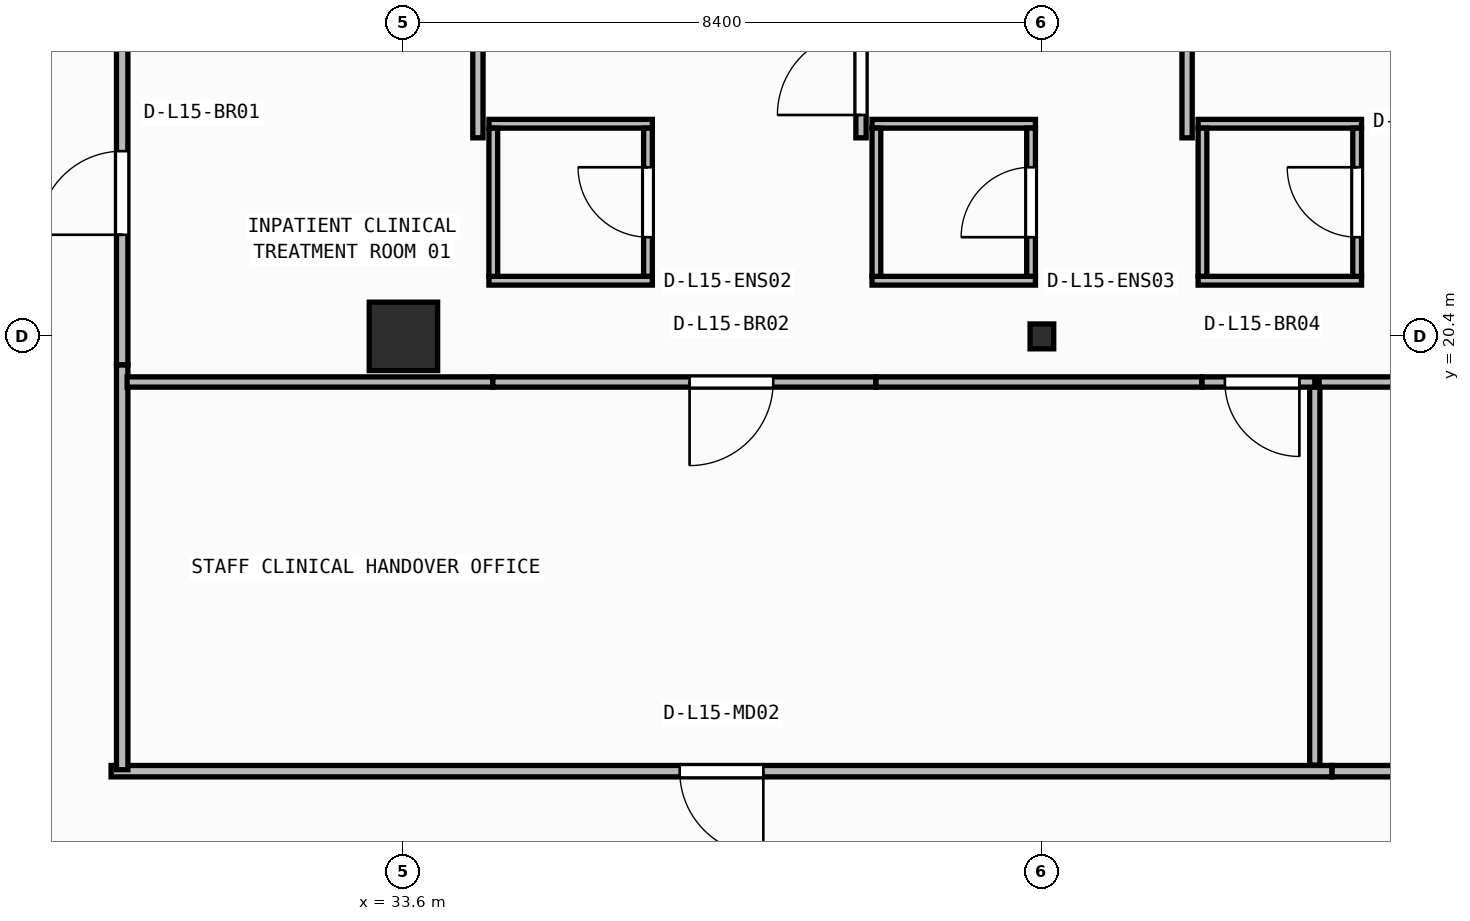
"""IFC4 building model, lengths in metres.
Left out: names, types, materials, properties, quantities, classifications, styles, units other than length and angle.
Written with IfcOpenShell. Run it as: python <this file> out.ifc"""

import sys

from ifc_helpers import new_model, si_unit, direction, frame, frame_2d, origin, origin_2d, place, context, subcontext, project, spatial, rectangle, i_section, extrude, element, fill, save


model = new_model("IFC4")
c1 = context("Model", 3, precision=1e-05, world=origin(), true_north=direction((0.0, 1.0)))
c2 = subcontext(c1, "Body", "Model", "MODEL_VIEW")
j1 = project(units=[si_unit("LENGTHUNIT", "METRE"), si_unit("PLANEANGLEUNIT", "RADIAN")], contexts=[c1])
p1 = place(None, origin())
s1 = spatial("IfcSite", under=j1, at=p1, CompositionType="ELEMENT")
p2 = place(p1, origin())
s2 = spatial("IfcBuilding", under=s1, at=p2, CompositionType="ELEMENT")
p3 = place(p2, frame((0.0, 0.0, 62.0)))
s3 = spatial("IfcBuildingStorey", under=s2, at=p3, CompositionType="ELEMENT", Elevation=62.0)
p4 = place(p3, frame((33.6, 20.4, 0.0), z_axis=(0.0, 0.0, 1.0), x_axis=(1.0, 0.0, 0.0)))
e1 = element("IfcColumn", 1, at=p4, inside=s3, PredefinedType="COLUMN", context=c2, shape_type="SweptSolid", body=[
    extrude(rectangle(XDim=0.9, YDim=0.9, at=origin_2d()), origin(), (0.0, 0.0, 1.0), 3.95),
])
p5 = place(p3, frame((42.0, 20.4, 0.0), z_axis=(0.0, 0.0, 1.0), x_axis=(1.0, 0.0, 0.0)))
e2 = element("IfcColumn", 2, at=p5, inside=s3, PredefinedType="COLUMN", context=c2, shape_type="SweptSolid", body=[
    extrude(i_section(OverallWidth=0.311, OverallDepth=0.327, WebThickness=0.016, FlangeThickness=0.025, FilletRadius=0.017, at=origin_2d()), origin(), (0.0, 0.0, 1.0), 3.95),
])
for number, where, z_axis, x_axis in (
    (3, (34.725, 21.133, 0.0), (0.0, 0.0, 1.0), (1.0, 0.0, 0.0)),
    (4, (34.725, 23.198, 0.0), (0.0, 0.0, 1.0), (1.0, 0.0, 0.0)),
):
    element("IfcWall", number, at=place(p3, frame(where, z_axis=z_axis, x_axis=x_axis)), inside=s3, PredefinedType="PARTITIONING", context=c2, shape_type="SweptSolid", body=[
        extrude(rectangle(XDim=2.15, YDim=0.115, at=frame_2d((1.075, 0.0))), origin(), (0.0, 0.0, 1.0), 3.71),
    ])
p6 = place(p3, frame((34.782, 21.19, 0.0), z_axis=(0.0, 0.0, 1.0), x_axis=(0.0, 1.0, 0.0)))
e5 = element("IfcWall", 5, at=p6, inside=s3, PredefinedType="PARTITIONING", context=c2, shape_type="SweptSolid", body=[
    extrude(rectangle(XDim=1.95, YDim=0.115, at=frame_2d((0.975, 0.0))), origin(), (0.0, 0.0, 1.0), 3.71),
])
p7 = place(p3, frame((36.817, 21.19, 0.0), z_axis=(0.0, 0.0, 1.0), x_axis=(0.0, 1.0, 0.0)))
e6 = element("IfcWall", 6, at=p7, inside=s3, PredefinedType="PARTITIONING", context=c2, shape_type="SweptSolid", body=[
    extrude(rectangle(XDim=1.95, YDim=0.115, at=frame_2d((0.975, 0.0))), origin(), (0.0, 0.0, 1.0), 3.71),
])
p8 = place(p7, frame((0.515, 0.0, 0.0)))
e7 = element("IfcOpeningElement", 7, at=p8, cuts=e6, PredefinedType="OPENING", context=c2, shape_type="SweptSolid", body=[
    extrude(rectangle(XDim=0.92, YDim=2.1, at=frame_2d((0.46, 1.05))), frame((0.0, 0.067, 0.0), z_axis=(0.0, -1.0, 0.0), x_axis=(1.0, 0.0, 0.0)), (0.0, 0.0, 1.0), 0.135),
])
for number, where, z_axis, x_axis in (
    (8, (39.765, 21.133, 0.0), (0.0, 0.0, 1.0), (1.0, 0.0, 0.0)),
    (9, (39.765, 23.198, 0.0), (0.0, 0.0, 1.0), (1.0, 0.0, 0.0)),
):
    element("IfcWall", number, at=place(p3, frame(where, z_axis=z_axis, x_axis=x_axis)), inside=s3, PredefinedType="PARTITIONING", context=c2, shape_type="SweptSolid", body=[
        extrude(rectangle(XDim=2.15, YDim=0.115, at=frame_2d((1.075, 0.0))), origin(), (0.0, 0.0, 1.0), 3.71),
    ])
p9 = place(p3, frame((39.823, 21.19, 0.0), z_axis=(0.0, 0.0, 1.0), x_axis=(0.0, 1.0, 0.0)))
e10 = element("IfcWall", 10, at=p9, inside=s3, PredefinedType="PARTITIONING", context=c2, shape_type="SweptSolid", body=[
    extrude(rectangle(XDim=1.95, YDim=0.115, at=frame_2d((0.975, 0.0))), origin(), (0.0, 0.0, 1.0), 3.71),
])
p10 = place(p3, frame((41.857, 21.19, 0.0), z_axis=(0.0, 0.0, 1.0), x_axis=(0.0, 1.0, 0.0)))
e11 = element("IfcWall", 11, at=p10, inside=s3, PredefinedType="PARTITIONING", context=c2, shape_type="SweptSolid", body=[
    extrude(rectangle(XDim=1.95, YDim=0.115, at=frame_2d((0.975, 0.0))), origin(), (0.0, 0.0, 1.0), 3.073),
])
p11 = place(p10, frame((0.515, 0.0, 0.0)))
e12 = element("IfcOpeningElement", 12, at=p11, cuts=e11, PredefinedType="OPENING", context=c2, shape_type="SweptSolid", body=[
    extrude(rectangle(XDim=0.92, YDim=2.1, at=frame_2d((0.46, 1.05))), frame((0.0, 0.067, 0.0), z_axis=(0.0, -1.0, 0.0), x_axis=(1.0, 0.0, 0.0)), (0.0, 0.0, 1.0), 0.135),
])
for number, where, z_axis, x_axis in (
    (13, (44.055, 21.133, 0.0), (0.0, 0.0, 1.0), (1.0, 0.0, 0.0)),
    (14, (44.055, 23.198, 0.0), (0.0, 0.0, 1.0), (1.0, 0.0, 0.0)),
):
    element("IfcWall", number, at=place(p3, frame(where, z_axis=z_axis, x_axis=x_axis)), inside=s3, PredefinedType="PARTITIONING", context=c2, shape_type="SweptSolid", body=[
        extrude(rectangle(XDim=2.15, YDim=0.115, at=frame_2d((1.075, 0.0))), origin(), (0.0, 0.0, 1.0), 3.71),
    ])
p12 = place(p3, frame((44.113, 21.19, 0.0), z_axis=(0.0, 0.0, 1.0), x_axis=(0.0, 1.0, 0.0)))
e15 = element("IfcWall", 15, at=p12, inside=s3, PredefinedType="PARTITIONING", context=c2, shape_type="SweptSolid", body=[
    extrude(rectangle(XDim=1.95, YDim=0.115, at=frame_2d((0.975, 0.0))), origin(), (0.0, 0.0, 1.0), 3.71),
])
p13 = place(p3, frame((46.147, 21.19, 0.0), z_axis=(0.0, 0.0, 1.0), x_axis=(0.0, 1.0, 0.0)))
e16 = element("IfcWall", 16, at=p13, inside=s3, PredefinedType="PARTITIONING", context=c2, shape_type="SweptSolid", body=[
    extrude(rectangle(XDim=1.95, YDim=0.115, at=frame_2d((0.975, 0.0))), origin(), (0.0, 0.0, 1.0), 3.71),
])
p14 = place(p13, frame((0.515, 0.0, 0.0)))
e17 = element("IfcOpeningElement", 17, at=p14, cuts=e16, PredefinedType="OPENING", context=c2, shape_type="SweptSolid", body=[
    extrude(rectangle(XDim=0.92, YDim=2.1, at=frame_2d((0.46, 1.05))), frame((0.0, 0.067, 0.0), z_axis=(0.0, -1.0, 0.0), x_axis=(1.0, 0.0, 0.0)), (0.0, 0.0, 1.0), 0.135),
])
p15 = place(p3, frame((45.816, 14.68, 0.0), z_axis=(0.0, 0.0, 1.0), x_axis=(-1.0, 0.0, 0.0)))
e18 = element("IfcWall", 18, at=p15, inside=s3, PredefinedType="PARTITIONING", context=c2, shape_type="SweptSolid", body=[
    extrude(rectangle(XDim=16.062, YDim=0.15, at=frame_2d((8.031, 0.0))), origin(), (0.0, 0.0, 1.0), 3.71),
])
p16 = place(p15, frame((7.481, 0.0, 0.0)))
e19 = element("IfcOpeningElement", 19, at=p16, cuts=e18, PredefinedType="OPENING", context=c2, shape_type="SweptSolid", body=[
    extrude(rectangle(XDim=1.1, YDim=2.1, at=frame_2d((0.55, 1.05))), frame((0.0, 0.085, 0.0), z_axis=(0.0, -1.0, 0.0), x_axis=(1.0, 0.0, 0.0)), (0.0, 0.0, 1.0), 0.17),
])
p17 = place(p3, frame((58.04, 14.68, 0.0), z_axis=(0.0, 0.0, 1.0), x_axis=(-1.0, 0.0, 0.0)))
e20 = element("IfcWall", 20, at=p17, inside=s3, PredefinedType="PARTITIONING", context=c2, shape_type="SweptSolid", body=[
    extrude(rectangle(XDim=12.222, YDim=0.15, at=frame_2d((6.111, 0.0))), origin(), (0.0, 0.0, 1.0), 3.71),
])
p18 = place(p17, frame((5.561, 0.0, 0.0)))
e21 = element("IfcOpeningElement", 21, at=p18, cuts=e20, PredefinedType="OPENING", context=c2, shape_type="SweptSolid", body=[
    extrude(rectangle(XDim=1.1, YDim=2.1, at=frame_2d((0.55, 1.05))), frame((0.0, 0.085, 0.0), z_axis=(0.0, -1.0, 0.0), x_axis=(1.0, 0.0, 0.0)), (0.0, 0.0, 1.0), 0.17),
])
p19 = place(p3, frame((29.9, 14.7, 0.0), z_axis=(0.0, 0.0, 1.0), x_axis=(0.0, 1.0, 0.0)))
e22 = element("IfcWall", 22, at=p19, inside=s3, PredefinedType="PARTITIONING", context=c2, shape_type="SweptSolid", body=[
    extrude(rectangle(XDim=5.326, YDim=0.15, at=frame_2d((2.663, 0.0))), origin(), (0.0, 0.0, 1.0), 3.71),
])
p20 = place(p3, frame((29.9, 20.028, 0.0), z_axis=(0.0, 0.0, 1.0), x_axis=(0.0, 1.0, 0.0)))
e23 = element("IfcWall", 23, at=p20, inside=s3, PredefinedType="PARTITIONING", context=c2, shape_type="SweptSolid", body=[
    extrude(rectangle(XDim=4.518, YDim=0.15, at=frame_2d((2.259, 0.0))), origin(), (0.0, 0.0, 1.0), 3.71),
])
p21 = place(p20, frame((1.709, 0.0, 0.0)))
e24 = element("IfcOpeningElement", 24, at=p21, cuts=e23, PredefinedType="OPENING", context=c2, shape_type="SweptSolid", body=[
    extrude(rectangle(XDim=1.1, YDim=2.1, at=frame_2d((0.55, 1.05))), frame((0.0, 0.085, 0.0), z_axis=(0.0, -1.0, 0.0), x_axis=(1.0, 0.0, 0.0)), (0.0, 0.0, 1.0), 0.17),
])
p22 = place(p3, frame((45.59, 14.76, 0.0), z_axis=(0.0, 0.0, 1.0), x_axis=(0.0, 1.0, 0.0)))
e25 = element("IfcWall", 25, at=p22, inside=s3, PredefinedType="PARTITIONING", context=c2, shape_type="SweptSolid", body=[
    extrude(rectangle(XDim=5.04, YDim=0.135, at=frame_2d((2.52, 0.0))), origin(), (0.0, 0.0, 1.0), 3.71),
])
p23 = place(p3, frame((34.775, 19.8, 0.0), z_axis=(0.0, 0.0, 1.0), x_axis=(-1.0, 0.0, 0.0)))
e26 = element("IfcWall", 26, at=p23, inside=s3, PredefinedType="PARTITIONING", context=c2, shape_type="SweptSolid", body=[
    extrude(rectangle(XDim=4.81, YDim=0.135, at=frame_2d((2.405, 0.0))), origin(), (0.0, 0.0, 1.0), 3.71),
])
p24 = place(p3, frame((39.815, 19.8, 0.0), z_axis=(0.0, 0.0, 1.0), x_axis=(-1.0, 0.0, 0.0)))
e27 = element("IfcWall", 27, at=p24, inside=s3, PredefinedType="PARTITIONING", context=c2, shape_type="SweptSolid", body=[
    extrude(rectangle(XDim=5.038, YDim=0.135, at=frame_2d((2.519, 0.0))), origin(), (0.0, 0.0, 1.0), 3.71),
])
p25 = place(p24, frame((1.35, 0.0, 0.0)))
e28 = element("IfcOpeningElement", 28, at=p25, cuts=e27, PredefinedType="OPENING", context=c2, shape_type="SweptSolid", body=[
    extrude(rectangle(XDim=1.1, YDim=2.1, at=frame_2d((0.55, 1.05))), frame((0.0, 0.077, 0.0), z_axis=(0.0, -1.0, 0.0), x_axis=(1.0, 0.0, 0.0)), (0.0, 0.0, 1.0), 0.155),
])
p26 = place(p3, frame((44.104, 19.8, 0.0), z_axis=(0.0, 0.0, 1.0), x_axis=(-1.0, 0.0, 0.0)))
e29 = element("IfcWall", 29, at=p26, inside=s3, PredefinedType="PARTITIONING", context=c2, shape_type="SweptSolid", body=[
    extrude(rectangle(XDim=4.288, YDim=0.135, at=frame_2d((2.144, 0.0))), origin(), (0.0, 0.0, 1.0), 3.71),
])
p27 = place(p3, frame((45.59, 19.8, 0.0), z_axis=(0.0, 0.0, 1.0), x_axis=(-1.0, 0.0, 0.0)))
e30 = element("IfcWall", 30, at=p27, inside=s3, PredefinedType="PARTITIONING", context=c2, shape_type="SweptSolid", body=[
    extrude(rectangle(XDim=1.483, YDim=0.135, at=frame_2d((0.742, 0.0))), origin(), (0.0, 0.0, 1.0), 3.71),
])
p28 = place(p27, frame((0.203, 0.0, 0.0)))
e31 = element("IfcOpeningElement", 31, at=p28, cuts=e30, PredefinedType="OPENING", context=c2, shape_type="SweptSolid", body=[
    extrude(rectangle(XDim=0.98, YDim=2.1, at=frame_2d((0.49, 1.05))), frame((0.0, 0.077, 0.0), z_axis=(0.0, -1.0, 0.0), x_axis=(1.0, 0.0, 0.0)), (0.0, 0.0, 1.0), 0.155),
])
p29 = place(p3, frame((48.765, 19.8, 0.0), z_axis=(0.0, 0.0, 1.0), x_axis=(-1.0, 0.0, 0.0)))
e32 = element("IfcWall", 32, at=p29, inside=s3, PredefinedType="PARTITIONING", context=c2, shape_type="SweptSolid", body=[
    extrude(rectangle(XDim=3.117, YDim=0.135, at=frame_2d((1.559, 0.0))), origin(), (0.0, 0.0, 1.0), 3.71),
])
p30 = place(p3, frame((34.58, 23.012, 0.0), z_axis=(0.0, 0.0, 1.0), x_axis=(0.0, 1.0, 0.0)))
e33 = element("IfcWall", 33, at=p30, inside=s3, PredefinedType="PARTITIONING", context=c2, shape_type="SweptSolid", body=[
    extrude(rectangle(XDim=3.508, YDim=0.135, at=frame_2d((1.754, 0.0))), origin(), (0.0, 0.0, 1.0), 3.71),
])
p31 = place(p3, frame((39.62, 23.012, 0.0), z_axis=(0.0, 0.0, 1.0), x_axis=(0.0, 1.0, 0.0)))
e34 = element("IfcWall", 34, at=p31, inside=s3, PredefinedType="PARTITIONING", context=c2, shape_type="SweptSolid", body=[
    extrude(rectangle(XDim=3.508, YDim=0.135, at=frame_2d((1.754, 0.0))), origin(), (0.0, 0.0, 1.0), 3.71),
])
p32 = place(p31, frame((0.3, 0.0, 0.0)))
e35 = element("IfcOpeningElement", 35, at=p32, cuts=e34, PredefinedType="OPENING", context=c2, shape_type="SweptSolid", body=[
    extrude(rectangle(XDim=1.1, YDim=2.1, at=frame_2d((0.55, 1.05))), frame((0.0, 0.077, 0.0), z_axis=(0.0, -1.0, 0.0), x_axis=(1.0, 0.0, 0.0)), (0.0, 0.0, 1.0), 0.155),
])
p33 = place(p3, frame((43.91, 23.012, 0.0), z_axis=(0.0, 0.0, 1.0), x_axis=(0.0, 1.0, 0.0)))
e36 = element("IfcWall", 36, at=p33, inside=s3, PredefinedType="PARTITIONING", context=c2, shape_type="SweptSolid", body=[
    extrude(rectangle(XDim=3.508, YDim=0.135, at=frame_2d((1.754, 0.0))), origin(), (0.0, 0.0, 1.0), 3.71),
])
p34 = place(p8, origin())
e37 = element("IfcDoor", 37, at=p34, inside=s3, OperationType="SINGLE_SWING_RIGHT", PredefinedType="DOOR", context=c2, shape_type="SweptSolid", body=[
    extrude(rectangle(XDim=0.92, YDim=2.1, at=frame_2d((0.46, 1.05))), frame((0.0, 0.025, 0.0), z_axis=(0.0, -1.0, 0.0), x_axis=(1.0, 0.0, 0.0)), (0.0, 0.0, 1.0), 0.05),
])
fill(e7, e37)
p35 = place(p11, origin())
e38 = element("IfcDoor", 38, at=p35, inside=s3, OperationType="SINGLE_SWING_LEFT", PredefinedType="DOOR", context=c2, shape_type="SweptSolid", body=[
    extrude(rectangle(XDim=0.92, YDim=2.1, at=frame_2d((0.46, 1.05))), frame((0.0, 0.025, 0.0), z_axis=(0.0, -1.0, 0.0), x_axis=(1.0, 0.0, 0.0)), (0.0, 0.0, 1.0), 0.05),
])
fill(e12, e38)
p36 = place(p14, origin())
e39 = element("IfcDoor", 39, at=p36, inside=s3, OperationType="SINGLE_SWING_RIGHT", PredefinedType="DOOR", context=c2, shape_type="SweptSolid", body=[
    extrude(rectangle(XDim=0.92, YDim=2.1, at=frame_2d((0.46, 1.05))), frame((0.0, 0.025, 0.0), z_axis=(0.0, -1.0, 0.0), x_axis=(1.0, 0.0, 0.0)), (0.0, 0.0, 1.0), 0.05),
])
fill(e17, e39)
p37 = place(p16, origin())
e40 = element("IfcDoor", 40, at=p37, inside=s3, OperationType="SINGLE_SWING_LEFT", PredefinedType="DOOR", context=c2, shape_type="SweptSolid", body=[
    extrude(rectangle(XDim=1.1, YDim=2.1, at=frame_2d((0.55, 1.05))), frame((0.0, 0.025, 0.0), z_axis=(0.0, -1.0, 0.0), x_axis=(1.0, 0.0, 0.0)), (0.0, 0.0, 1.0), 0.05),
])
fill(e19, e40)
p38 = place(p21, origin())
e41 = element("IfcDoor", 41, at=p38, inside=s3, OperationType="SINGLE_SWING_LEFT", PredefinedType="DOOR", context=c2, shape_type="SweptSolid", body=[
    extrude(rectangle(XDim=1.1, YDim=2.1, at=frame_2d((0.55, 1.05))), frame((0.0, 0.025, 0.0), z_axis=(0.0, -1.0, 0.0), x_axis=(1.0, 0.0, 0.0)), (0.0, 0.0, 1.0), 0.05),
])
fill(e24, e41)
p39 = place(p25, origin())
e42 = element("IfcDoor", 42, at=p39, inside=s3, OperationType="SINGLE_SWING_RIGHT", PredefinedType="DOOR", context=c2, shape_type="SweptSolid", body=[
    extrude(rectangle(XDim=1.1, YDim=2.1, at=frame_2d((0.55, 1.05))), frame((0.0, 0.025, 0.0), z_axis=(0.0, -1.0, 0.0), x_axis=(1.0, 0.0, 0.0)), (0.0, 0.0, 1.0), 0.05),
])
fill(e28, e42)
p40 = place(p28, origin())
e43 = element("IfcDoor", 43, at=p40, inside=s3, OperationType="SINGLE_SWING_LEFT", PredefinedType="DOOR", context=c2, shape_type="SweptSolid", body=[
    extrude(rectangle(XDim=0.98, YDim=2.1, at=frame_2d((0.49, 1.05))), frame((0.0, 0.025, 0.0), z_axis=(0.0, -1.0, 0.0), x_axis=(1.0, 0.0, 0.0)), (0.0, 0.0, 1.0), 0.05),
])
fill(e31, e43)
p41 = place(p32, origin())
e44 = element("IfcDoor", 44, at=p41, inside=s3, OperationType="SINGLE_SWING_LEFT", PredefinedType="DOOR", context=c2, shape_type="SweptSolid", body=[
    extrude(rectangle(XDim=1.1, YDim=2.1, at=frame_2d((0.55, 1.05))), frame((0.0, 0.025, 0.0), z_axis=(0.0, -1.0, 0.0), x_axis=(1.0, 0.0, 0.0)), (0.0, 0.0, 1.0), 0.05),
])
fill(e35, e44)
save(model, sys.argv[1])
